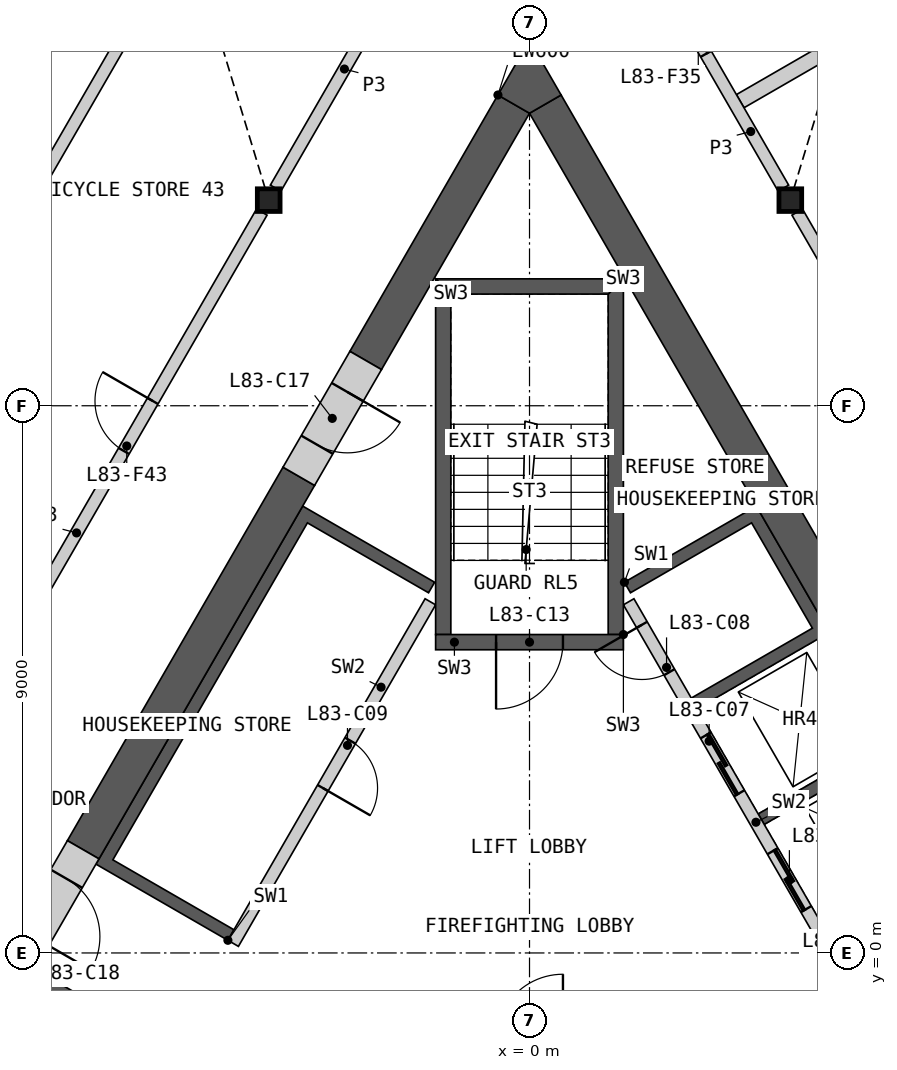
"""IFC4 building model, lengths in metres.
Left out: names, types, materials, properties, quantities, classifications, styles, units other than length and angle.
Written with IfcOpenShell. Run it as: python <this file> out.ifc"""

import sys

from ifc_helpers import new_model, si_unit, direction, frame, frame_2d, origin, origin_2d, place, context, subcontext, project, spatial, polyline, rectangle, i_section, outline, extrude, element, fill, save


model = new_model("IFC4")
c1 = context("Model", 3, precision=1e-05, world=origin(), true_north=direction((0.0, 1.0)))
c2 = subcontext(c1, "Body", "Model", "MODEL_VIEW")
j1 = project(units=[si_unit("LENGTHUNIT", "METRE"), si_unit("PLANEANGLEUNIT", "RADIAN")], contexts=[c1])
p1 = place(None, origin())
s1 = spatial("IfcSite", under=j1, at=p1, CompositionType="ELEMENT")
p2 = place(p1, origin())
s2 = spatial("IfcBuilding", under=s1, at=p2, CompositionType="ELEMENT")
p3 = place(p2, frame((0.0, 0.0, 371.2)))
s3 = spatial("IfcBuildingStorey", under=s2, at=p3, CompositionType="ELEMENT", Elevation=371.2)
for number, where, z_axis, x_axis in (
    (1, (-4.289, 12.382, 0.0), (0.0, 0.0, 1.0), (1.0, 0.0, 0.0)),
    (2, (4.289, 12.382, 0.0), (0.0, 0.0, 1.0), (1.0, 0.0, 0.0)),
):
    element("IfcColumn", number, at=place(p3, frame(where, z_axis=z_axis, x_axis=x_axis)), inside=s3, PredefinedType="COLUMN", context=c2, shape_type="SweptSolid", body=[
        extrude(i_section(OverallWidth=0.374, OverallDepth=0.372, WebThickness=0.016, FlangeThickness=0.026, at=origin_2d()), origin(), (0.0, 0.0, 1.0), 3.4),
    ])
p4 = place(p3, origin())
e3 = element("IfcWall", 3, at=p4, inside=s3, PredefinedType="SHEAR", context=c2, shape_type="SweptSolid", body=[
    extrude(outline(polyline([(1.561, 6.097), (3.731, 7.35), (8.231, -0.444), (6.061, -1.697), (5.96, -1.524), (7.952, -0.374), (6.952, 1.358), (4.96, 0.208), (4.861, 0.381), (6.852, 1.531), (5.852, 3.263), (3.861, 2.113), (3.76, 2.287), (5.752, 3.437), (4.752, 5.169), (2.76, 4.019), (2.66, 4.192), (4.652, 5.342), (3.652, 7.074), (1.66, 5.924), (1.561, 6.097)])), origin(), (0.0, 0.0, 1.0), 3.1),
])
p5 = place(p3, frame((5.817, -1.476, 0.0), z_axis=(0.0, 0.0, 1.0), x_axis=(-0.500002616675, 0.866023893041, 0.0)))
e4 = element("IfcWall", 4, at=p5, inside=s3, PredefinedType="SOLIDWALL", context=c2, shape_type="SweptSolid", body=[
    extrude(rectangle(XDim=8.373, YDim=0.2, at=frame_2d((4.187, 0.0))), origin(), (0.0, 0.0, 1.0), 3.1),
])
p6 = place(p5, frame((0.337, 0.0, 0.0)))
e5 = element("IfcOpeningElement", 5, at=p6, cuts=e4, PredefinedType="OPENING", context=c2, shape_type="SweptSolid", body=[
    extrude(rectangle(XDim=1.1, YDim=2.1, at=frame_2d((0.55, 1.05))), frame((0.0, 0.11, 0.0), z_axis=(0.0, -1.0, 0.0), x_axis=(1.0, 0.0, 0.0)), (0.0, 0.0, 1.0), 0.22),
])
p7 = place(p5, frame((2.537, 0.0, 0.0)))
e6 = element("IfcOpeningElement", 6, at=p7, cuts=e4, PredefinedType="OPENING", context=c2, shape_type="SweptSolid", body=[
    extrude(rectangle(XDim=1.1, YDim=2.1, at=frame_2d((0.55, 1.05))), frame((0.0, 0.11, 0.0), z_axis=(0.0, -1.0, 0.0), x_axis=(1.0, 0.0, 0.0)), (0.0, 0.0, 1.0), 0.22),
])
p8 = place(p5, frame((4.737, 0.0, 0.0)))
e7 = element("IfcOpeningElement", 7, at=p8, cuts=e4, PredefinedType="OPENING", context=c2, shape_type="SweptSolid", body=[
    extrude(rectangle(XDim=1.1, YDim=2.1, at=frame_2d((0.55, 1.05))), frame((0.0, 0.11, 0.0), z_axis=(0.0, -1.0, 0.0), x_axis=(1.0, 0.0, 0.0)), (0.0, 0.0, 1.0), 0.22),
])
p9 = place(p5, frame((7.037, 0.0, 0.0)))
e8 = element("IfcOpeningElement", 8, at=p9, cuts=e4, PredefinedType="OPENING", context=c2, shape_type="SweptSolid", body=[
    extrude(rectangle(XDim=0.9, YDim=2.1, at=frame_2d((0.45, 1.05))), frame((0.0, 0.11, 0.0), z_axis=(0.0, -1.0, 0.0), x_axis=(1.0, 0.0, 0.0)), (0.0, 0.0, 1.0), 0.22),
])
p10 = place(p3, origin())
e9 = element("IfcWall", 9, at=p10, inside=s3, PredefinedType="SHEAR", context=c2, shape_type="SweptSolid", body=[
    extrude(outline(polyline([(-6.061, -1.697), (-8.231, -0.444), (-8.131, -0.271), (-5.96, -1.524), (-6.061, -1.697)])), origin(), (0.0, 0.0, 1.0), 3.1),
])
p11 = place(p3, origin())
e10 = element("IfcWall", 10, at=p11, inside=s3, PredefinedType="SHEAR", context=c2, shape_type="SweptSolid", body=[
    extrude(outline(polyline([(-4.96, 0.208), (-7.131, 1.461), (-3.731, 7.35), (-1.561, 6.097), (-1.66, 5.924), (-3.652, 7.074), (-6.852, 1.531), (-4.861, 0.381), (-4.96, 0.208)])), origin(), (0.0, 0.0, 1.0), 3.1),
])
p12 = place(p3, frame((-1.631, 5.776, 0.0), z_axis=(0.0, 0.0, 1.0), x_axis=(-0.499992876559, -0.866029516466, 0.0)))
e11 = element("IfcWall", 11, at=p12, inside=s3, PredefinedType="SOLIDWALL", context=c2, shape_type="SweptSolid", body=[
    extrude(rectangle(XDim=6.486, YDim=0.2, at=frame_2d((3.243, 0.0))), origin(), (0.0, 0.0, 1.0), 3.1),
])
p13 = place(p12, frame((2.637, 0.0, 0.0)))
e12 = element("IfcOpeningElement", 12, at=p13, cuts=e11, PredefinedType="OPENING", context=c2, shape_type="SweptSolid", body=[
    extrude(rectangle(XDim=0.9, YDim=2.1, at=frame_2d((0.45, 1.05))), frame((0.0, 0.11, 0.0), z_axis=(0.0, -1.0, 0.0), x_axis=(1.0, 0.0, 0.0)), (0.0, 0.0, 1.0), 0.22),
])
p14 = place(p3, origin())
e13 = element("IfcWall", 13, at=p14, inside=s3, PredefinedType="SHEAR", context=c2, shape_type="SweptSolid", body=[
    extrude(outline(polyline([(1.544, 5.237), (1.544, 11.087), (1.294, 10.837), (1.294, 5.237), (1.544, 5.237)])), origin(), (0.0, 0.0, 1.0), 3.1),
])
p15 = place(p3, origin())
e14 = element("IfcWall", 14, at=p15, inside=s3, PredefinedType="SHEAR", context=c2, shape_type="SweptSolid", body=[
    extrude(outline(polyline([(1.544, 11.087), (-1.544, 11.087), (-1.294, 10.837), (1.294, 10.837), (1.544, 11.087)])), origin(), (0.0, 0.0, 1.0), 3.1),
])
p16 = place(p3, origin())
e15 = element("IfcWall", 15, at=p16, inside=s3, PredefinedType="SHEAR", context=c2, shape_type="SweptSolid", body=[
    extrude(outline(polyline([(-1.294, 10.837), (-1.544, 11.087), (-1.544, 5.237), (-1.294, 5.237), (-1.294, 10.837)])), origin(), (0.0, 0.0, 1.0), 3.1),
])
p17 = place(p3, frame((1.544, 5.112, 0.0), z_axis=(0.0, 0.0, 1.0), x_axis=(-1.0, 0.0, 0.0)))
e16 = element("IfcWall", 16, at=p17, inside=s3, PredefinedType="SHEAR", context=c2, shape_type="SweptSolid", body=[
    extrude(rectangle(XDim=3.088, YDim=0.25, at=frame_2d((1.544, 0.0))), origin(), (0.0, 0.0, 1.0), 3.1),
])
p18 = place(p17, frame((0.994, 0.0, 0.0)))
e17 = element("IfcOpeningElement", 17, at=p18, cuts=e16, PredefinedType="OPENING", context=c2, shape_type="SweptSolid", body=[
    extrude(rectangle(XDim=1.1, YDim=2.1, at=frame_2d((0.55, 1.05))), frame((0.0, 0.135, 0.0), z_axis=(0.0, -1.0, 0.0), x_axis=(1.0, 0.0, 0.0)), (0.0, 0.0, 1.0), 0.27),
])
p19 = place(p3, frame((8.686, -0.634, 0.0), z_axis=(0.0, 0.0, 1.0), x_axis=(-0.500004601921, 0.866022746848, 0.0)))
e18 = element("IfcWall", 18, at=p19, inside=s3, PredefinedType="SHEAR", context=c2, shape_type="SweptSolid", body=[
    extrude(rectangle(XDim=16.853, YDim=0.6, at=frame_2d((8.426, 0.0))), origin(), (0.0, 0.0, 1.0), 3.1),
])
p20 = place(p3, frame((-3.794, 7.84, 0.0), z_axis=(0.0, 0.0, 1.0), x_axis=(-0.499974747889, -0.866039982607, 0.0)))
e19 = element("IfcWall", 19, at=p20, inside=s3, PredefinedType="SHEAR", context=c2, shape_type="SweptSolid", body=[
    extrude(rectangle(XDim=7.092, YDim=0.6, at=frame_2d((3.546, 0.0))), origin(), (0.0, 0.0, 1.0), 3.1),
])
p21 = place(p3, frame((-0.26, 13.961, 0.0), z_axis=(0.0, 0.0, 1.0), x_axis=(-0.50000604952, -0.866021911064, 0.0)))
e20 = element("IfcWall", 20, at=p21, inside=s3, PredefinedType="SHEAR", context=c2, shape_type="SweptSolid", body=[
    extrude(rectangle(XDim=4.869, YDim=0.6, at=frame_2d((2.434, 0.0))), origin(), (0.0, 0.0, 1.0), 3.1),
])
p22 = place(p3, origin())
e21 = element("IfcWall", 21, at=p22, inside=s3, PredefinedType="SHEAR", context=c2, shape_type="SweptSolid", body=[
    extrude(outline(polyline([(-0.52, 14.111), (0.0, 15.011), (0.52, 14.111), (0.0, 13.811), (-0.52, 14.111)])), origin(), (0.0, 0.0, 1.0), 3.1),
])
p23 = place(p3, frame((-2.694, 9.745, 0.0), z_axis=(0.0, 0.0, 1.0), x_axis=(-0.50002983664, -0.866008176907, 0.0)))
e22 = element("IfcWall", 22, at=p23, inside=s3, PredefinedType="SHEAR", context=c2, shape_type="SweptSolid", body=[
    extrude(rectangle(XDim=2.2, YDim=0.6, at=frame_2d((1.1, 0.0))), origin(), (0.0, 0.0, 1.0), 3.1),
])
p24 = place(p23, frame((0.6, 0.0, 0.0)))
e23 = element("IfcOpeningElement", 23, at=p24, cuts=e22, PredefinedType="OPENING", context=c2, shape_type="SweptSolid", body=[
    extrude(rectangle(XDim=1.0, YDim=2.1, at=frame_2d((0.5, 1.05))), frame((0.0, 0.31, 0.0), z_axis=(0.0, -1.0, 0.0), x_axis=(1.0, 0.0, 0.0)), (0.0, 0.0, 1.0), 0.62),
])
p25 = place(p3, frame((-7.34, 1.698, 0.0), z_axis=(0.0, 0.0, 1.0), x_axis=(-0.50002983664, -0.866008176907, 0.0)))
e24 = element("IfcWall", 24, at=p25, inside=s3, PredefinedType="SHEAR", context=c2, shape_type="SweptSolid", body=[
    extrude(rectangle(XDim=2.2, YDim=0.6, at=frame_2d((1.1, 0.0))), origin(), (0.0, 0.0, 1.0), 3.1),
])
p26 = place(p25, frame((0.55, 0.0, 0.0)))
e25 = element("IfcOpeningElement", 25, at=p26, cuts=e24, PredefinedType="OPENING", context=c2, shape_type="SweptSolid", body=[
    extrude(rectangle(XDim=1.1, YDim=2.1, at=frame_2d((0.55, 1.05))), frame((0.0, 0.31, 0.0), z_axis=(0.0, -1.0, 0.0), x_axis=(1.0, 0.0, 0.0)), (0.0, 0.0, 1.0), 0.62),
])
p27 = place(p3, frame((3.465, 14.01, 0.0), z_axis=(0.0, 0.0, 1.0), x_axis=(0.866032376801, 0.499987922186, 0.0)))
e26 = element("IfcWall", 26, at=p27, inside=s3, PredefinedType="PARTITIONING", context=c2, shape_type="SweptSolid", body=[
    extrude(rectangle(XDim=11.782, YDim=0.25, at=frame_2d((5.891, 0.0))), origin(), (0.0, 0.0, 1.0), 2.33),
])
p28 = place(p3, frame((4.403, 12.185, 0.0), z_axis=(0.0, 0.0, 1.0), x_axis=(0.499992155518, -0.866029932751, 0.0)))
e27 = element("IfcWall", 27, at=p28, inside=s3, PredefinedType="PARTITIONING", context=c2, shape_type="SweptSolid", body=[
    extrude(rectangle(XDim=8.123, YDim=0.2, at=frame_2d((4.062, 0.0))), origin(), (0.0, 0.0, 1.0), 3.1),
])
p29 = place(p28, frame((3.963, 0.0, 0.0)))
e28 = element("IfcOpeningElement", 28, at=p29, cuts=e27, PredefinedType="OPENING", context=c2, shape_type="SweptSolid", body=[
    extrude(rectangle(XDim=1.0, YDim=2.1, at=frame_2d((0.5, 1.05))), frame((0.0, 0.11, 0.0), z_axis=(0.0, -1.0, 0.0), x_axis=(1.0, 0.0, 0.0)), (0.0, 0.0, 1.0), 0.22),
])
p30 = place(p3, frame((-8.465, 5.15, 0.0), z_axis=(0.0, 0.0, 1.0), x_axis=(0.499992155518, 0.866029932751, 0.0)))
e29 = element("IfcWall", 29, at=p30, inside=s3, PredefinedType="PARTITIONING", context=c2, shape_type="SweptSolid", body=[
    extrude(rectangle(XDim=8.123, YDim=0.2, at=frame_2d((4.062, 0.0))), origin(), (0.0, 0.0, 1.0), 3.1),
])
p31 = place(p30, frame((3.587, 0.0, 0.0)))
e30 = element("IfcOpeningElement", 30, at=p31, cuts=e29, PredefinedType="OPENING", context=c2, shape_type="SweptSolid", body=[
    extrude(rectangle(XDim=0.95, YDim=2.1, at=frame_2d((0.475, 1.05))), frame((0.0, 0.11, 0.0), z_axis=(0.0, -1.0, 0.0), x_axis=(1.0, 0.0, 0.0)), (0.0, 0.0, 1.0), 0.22),
])
p32 = place(p3, frame((-4.176, 12.579, 0.0), z_axis=(0.0, 0.0, 1.0), x_axis=(0.499974648164, 0.866040040179, 0.0)))
e31 = element("IfcWall", 31, at=p32, inside=s3, PredefinedType="PARTITIONING", context=c2, shape_type="SweptSolid", body=[
    extrude(rectangle(XDim=4.525, YDim=0.2, at=frame_2d((2.263, 0.0))), origin(), (0.0, 0.0, 1.0), 3.1),
])
p33 = place(p3, frame((2.025, 16.303, 0.0), z_axis=(0.0, 0.0, 1.0), x_axis=(0.500004215162, -0.866022970146, 0.0)))
e32 = element("IfcWall", 32, at=p33, inside=s3, PredefinedType="PARTITIONING", context=c2, shape_type="SweptSolid", body=[
    extrude(rectangle(XDim=4.3, YDim=0.2, at=frame_2d((2.15, 0.0))), origin(), (0.0, 0.0, 1.0), 3.1),
])
p34 = place(p33, frame((0.75, 0.0, 0.0)))
e33 = element("IfcOpeningElement", 33, at=p34, cuts=e32, PredefinedType="OPENING", context=c2, shape_type="SweptSolid", body=[
    extrude(rectangle(XDim=1.0, YDim=2.1, at=frame_2d((0.5, 1.05))), frame((0.0, 0.11, 0.0), z_axis=(0.0, -1.0, 0.0), x_axis=(1.0, 0.0, 0.0)), (0.0, 0.0, 1.0), 0.22),
])
p35 = place(p3, frame((-11.473, 6.74, 0.0), z_axis=(0.0, 0.0, 1.0), x_axis=(0.500001082559, 0.866024778768, 0.0)))
e34 = element("IfcWall", 34, at=p35, inside=s3, PredefinedType="PARTITIONING", context=c2, shape_type="SweptSolid", body=[
    extrude(rectangle(XDim=15.094, YDim=0.2, at=frame_2d((7.547, 0.0))), origin(), (0.0, 0.0, 1.0), 2.33),
])
p36 = place(p35, frame((10.383, 0.0, 0.0)))
e35 = element("IfcOpeningElement", 35, at=p36, cuts=e34, PredefinedType="OPENING", context=c2, shape_type="SweptSolid", body=[
    extrude(rectangle(XDim=0.95, YDim=2.1, at=frame_2d((0.475, 1.05))), frame((0.0, 0.11, 0.0), z_axis=(0.0, -1.0, 0.0), x_axis=(1.0, 0.0, 0.0)), (0.0, 0.0, 1.0), 0.22),
])
p37 = place(p7, origin())
e36 = element("IfcDoor", 36, at=p37, inside=s3, OperationType="SLIDING_TO_LEFT", PredefinedType="DOOR", context=c2, shape_type="SweptSolid", body=[
    extrude(rectangle(XDim=1.1, YDim=2.1, at=frame_2d((0.55, 1.05))), frame((0.0, 0.025, 0.0), z_axis=(0.0, -1.0, 0.0), x_axis=(1.0, 0.0, 0.0)), (0.0, 0.0, 1.0), 0.05),
])
fill(e6, e36)
p38 = place(p8, origin())
e37 = element("IfcDoor", 37, at=p38, inside=s3, OperationType="SLIDING_TO_LEFT", PredefinedType="DOOR", context=c2, shape_type="SweptSolid", body=[
    extrude(rectangle(XDim=1.1, YDim=2.1, at=frame_2d((0.55, 1.05))), frame((0.0, 0.025, 0.0), z_axis=(0.0, -1.0, 0.0), x_axis=(1.0, 0.0, 0.0)), (0.0, 0.0, 1.0), 0.05),
])
fill(e7, e37)
p39 = place(p9, origin())
e38 = element("IfcDoor", 38, at=p39, inside=s3, OperationType="SINGLE_SWING_RIGHT", PredefinedType="DOOR", context=c2, shape_type="SweptSolid", body=[
    extrude(rectangle(XDim=0.9, YDim=2.1, at=frame_2d((0.45, 1.05))), frame((0.0, 0.025, 0.0), z_axis=(0.0, -1.0, 0.0), x_axis=(1.0, 0.0, 0.0)), (0.0, 0.0, 1.0), 0.05),
])
fill(e8, e38)
p40 = place(p13, origin())
e39 = element("IfcDoor", 39, at=p40, inside=s3, OperationType="SINGLE_SWING_RIGHT", PredefinedType="DOOR", context=c2, shape_type="SweptSolid", body=[
    extrude(rectangle(XDim=0.9, YDim=2.1, at=frame_2d((0.45, 1.05))), frame((0.0, 0.025, 0.0), z_axis=(0.0, -1.0, 0.0), x_axis=(1.0, 0.0, 0.0)), (0.0, 0.0, 1.0), 0.05),
])
fill(e12, e39)
p41 = place(p18, origin())
e40 = element("IfcDoor", 40, at=p41, inside=s3, OperationType="SINGLE_SWING_RIGHT", PredefinedType="DOOR", context=c2, shape_type="SweptSolid", body=[
    extrude(rectangle(XDim=1.1, YDim=2.1, at=frame_2d((0.55, 1.05))), frame((0.0, 0.025, 0.0), z_axis=(0.0, -1.0, 0.0), x_axis=(1.0, 0.0, 0.0)), (0.0, 0.0, 1.0), 0.05),
])
fill(e17, e40)
p42 = place(p24, origin())
e41 = element("IfcDoor", 41, at=p42, inside=s3, OperationType="SINGLE_SWING_LEFT", PredefinedType="DOOR", context=c2, shape_type="SweptSolid", body=[
    extrude(rectangle(XDim=1.0, YDim=2.1, at=frame_2d((0.5, 1.05))), frame((0.0, 0.055, 0.0), z_axis=(0.0, -1.0, 0.0), x_axis=(1.0, 0.0, 0.0)), (0.0, 0.0, 1.0), 0.05),
])
fill(e23, e41)
p43 = place(p26, origin())
e42 = element("IfcDoor", 42, at=p43, inside=s3, OperationType="SINGLE_SWING_RIGHT", PredefinedType="DOOR", context=c2, shape_type="SweptSolid", body=[
    extrude(rectangle(XDim=1.1, YDim=2.1, at=frame_2d((0.55, 1.05))), frame((0.0, 0.055, 0.0), z_axis=(0.0, -1.0, 0.0), x_axis=(1.0, 0.0, 0.0)), (0.0, 0.0, 1.0), 0.05),
])
fill(e25, e42)
p44 = place(p34, origin())
e43 = element("IfcDoor", 43, at=p44, inside=s3, OperationType="SINGLE_SWING_RIGHT", PredefinedType="DOOR", context=c2, shape_type="SweptSolid", body=[
    extrude(rectangle(XDim=1.0, YDim=2.1, at=frame_2d((0.5, 1.05))), frame((0.0, 0.025, 0.0), z_axis=(0.0, -1.0, 0.0), x_axis=(1.0, 0.0, 0.0)), (0.0, 0.0, 1.0), 0.05),
])
fill(e33, e43)
p45 = place(p31, origin())
e44 = element("IfcDoor", 44, at=p45, inside=s3, OperationType="SINGLE_SWING_RIGHT", PredefinedType="DOOR", context=c2, shape_type="SweptSolid", body=[
    extrude(rectangle(XDim=0.95, YDim=2.1, at=frame_2d((0.475, 1.05))), frame((0.0, 0.025, 0.0), z_axis=(0.0, -1.0, 0.0), x_axis=(1.0, 0.0, 0.0)), (0.0, 0.0, 1.0), 0.05),
])
fill(e30, e44)
save(model, sys.argv[1])
